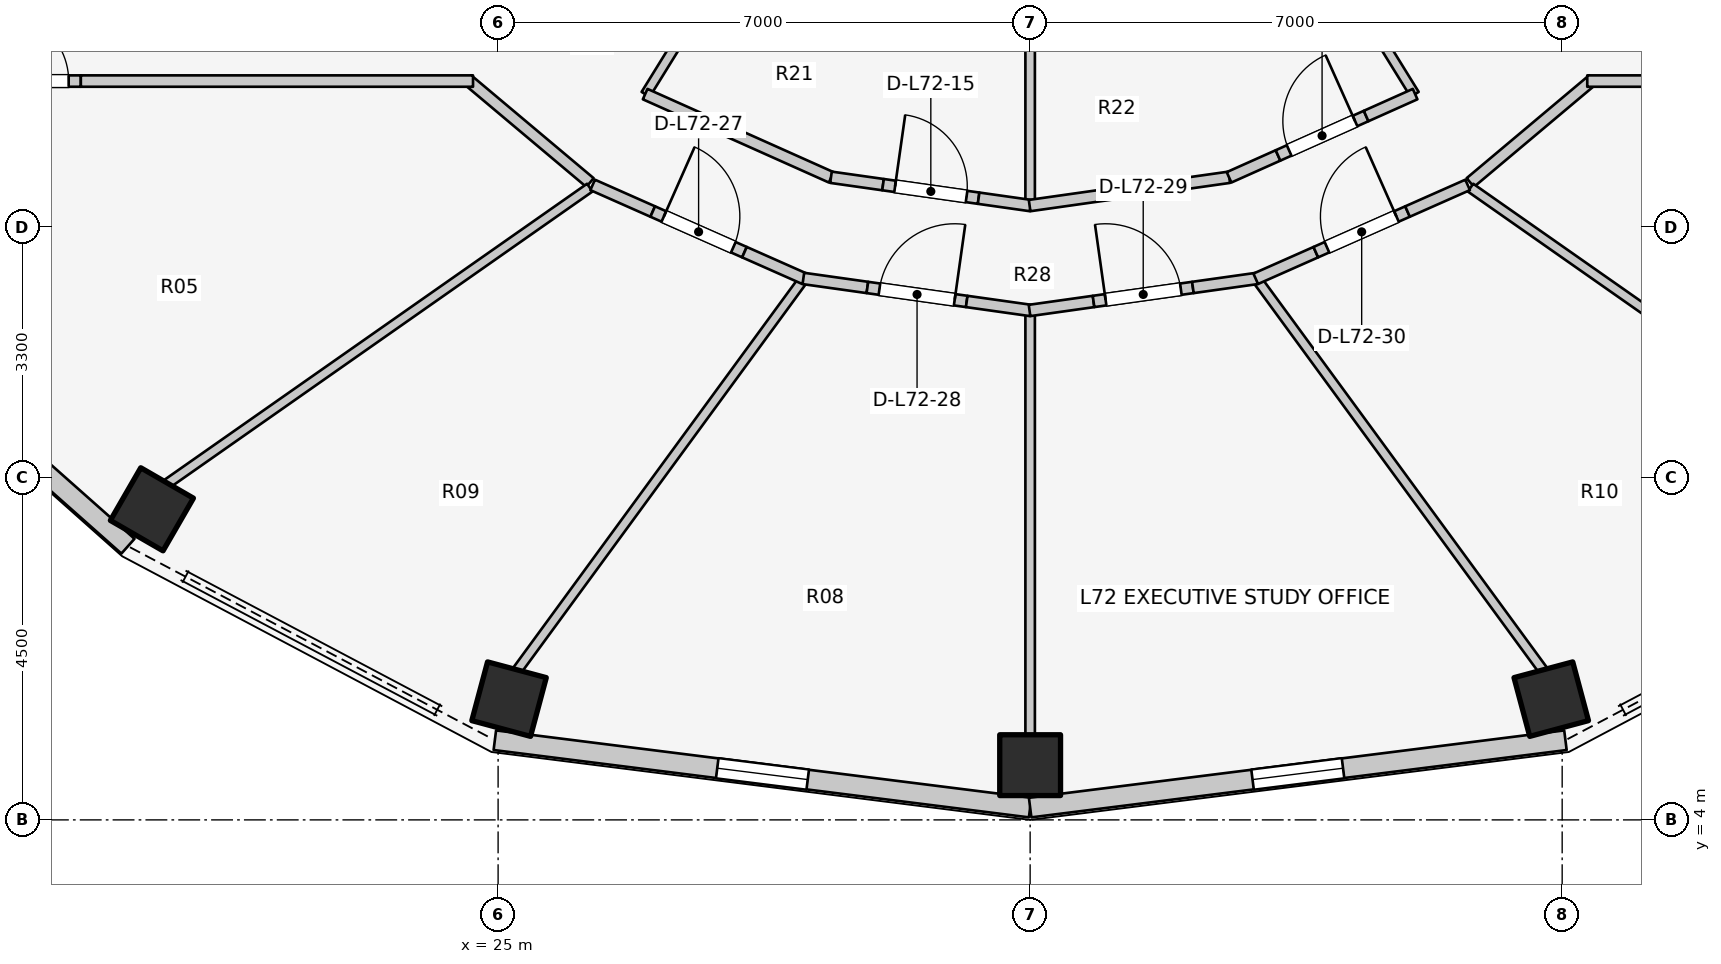
"""IFC4 building model, lengths in metres.
Left out: names, types, materials, properties, quantities, classifications, styles, units other than length and angle.
Written with IfcOpenShell. Run it as: python <this file> out.ifc"""

import sys

from ifc_helpers import new_model, si_unit, direction, frame, frame_2d, origin, origin_2d, place, context, subcontext, project, spatial, rectangle, extrude, element, fill, save


model = new_model("IFC4")
c1 = context("Model", 3, precision=1e-05, world=origin(), true_north=direction((0.0, 1.0)))
c2 = subcontext(c1, "Body", "Model", "MODEL_VIEW")
j1 = project(units=[si_unit("LENGTHUNIT", "METRE"), si_unit("PLANEANGLEUNIT", "RADIAN")], contexts=[c1])
p1 = place(None, origin())
s1 = spatial("IfcSite", under=j1, at=p1, CompositionType="ELEMENT")
p2 = place(p1, origin())
s2 = spatial("IfcBuilding", under=s1, at=p2, CompositionType="ELEMENT")
p3 = place(p2, frame((0.0, 0.0, 235.7)))
s3 = spatial("IfcBuildingStorey", under=s2, at=p3, CompositionType="ELEMENT", Elevation=235.7)
for number, where, z_axis, x_axis in (
    (1, (20.445, 8.086, 0.0), (0.0, 0.0, 1.0), (-0.5, -0.866, 0.0)),
    (2, (25.144, 5.589, 0.0), (0.0, 0.0, 1.0), (-0.259, -0.966, 0.0)),
    (3, (32.0, 4.72, 0.0), (0.0, 0.0, 1.0), (0.0, -1.0, 0.0)),
    (4, (38.856, 5.589, 0.0), (0.0, 0.0, 1.0), (0.259, -0.966, 0.0)),
):
    element("IfcColumn", number, at=place(p3, frame(where, z_axis=z_axis, x_axis=x_axis)), inside=s3, PredefinedType="COLUMN", context=c2, shape_type="SweptSolid", body=[
        extrude(rectangle(XDim=0.8, YDim=0.8, at=origin_2d()), origin(), (0.0, 0.0, 1.0), 3.1),
    ])
p4 = place(p3, frame((16.442, 10.871, 0.0), z_axis=(0.0, 0.0, 1.0), x_axis=(0.748165854006, -0.663511759428, 0.0)))
e5 = element("IfcWall", 5, at=p4, inside=s3, PredefinedType="STANDARD", context=c2, shape_type="SweptSolid", body=[
    extrude(rectangle(XDim=4.929, YDim=0.26, at=frame_2d((2.464, 0.0))), origin(), (0.0, 0.0, 1.0), 1.22),
])
p5 = place(p3, frame((24.957, 5.048, 0.0), z_axis=(0.0, 0.0, 1.0), x_axis=(0.992180211307, -0.124813574142, 0.0)))
e6 = element("IfcWall", 6, at=p5, inside=s3, PredefinedType="STANDARD", context=c2, shape_type="SweptSolid", body=[
    extrude(rectangle(XDim=7.098, YDim=0.26, at=frame_2d((3.549, 0.0))), origin(), (0.0, 0.0, 1.0), 1.22),
])
p6 = place(p5, frame((2.949, 0.0, 0.15)))
e7 = element("IfcOpeningElement", 7, at=p6, cuts=e6, PredefinedType="OPENING", context=c2, shape_type="SweptSolid", body=[
    extrude(rectangle(XDim=1.2, YDim=0.9, at=frame_2d((0.6, 0.45))), frame((0.0, 0.14, 0.0), z_axis=(0.0, -1.0, 0.0), x_axis=(1.0, 0.0, 0.0)), (0.0, 0.0, 1.0), 0.28),
])
p7 = place(p3, frame((32.0, 4.162, 0.0), z_axis=(0.0, 0.0, 1.0), x_axis=(0.992180211307, 0.124813574142, 0.0)))
e8 = element("IfcWall", 8, at=p7, inside=s3, PredefinedType="STANDARD", context=c2, shape_type="SweptSolid", body=[
    extrude(rectangle(XDim=7.098, YDim=0.26, at=frame_2d((3.549, 0.0))), origin(), (0.0, 0.0, 1.0), 1.22),
])
p8 = place(p7, frame((2.949, 0.0, 0.15)))
e9 = element("IfcOpeningElement", 9, at=p8, cuts=e8, PredefinedType="OPENING", context=c2, shape_type="SweptSolid", body=[
    extrude(rectangle(XDim=1.2, YDim=0.9, at=frame_2d((0.6, 0.45))), frame((0.0, 0.14, 0.0), z_axis=(0.0, -1.0, 0.0), x_axis=(1.0, 0.0, 0.0)), (0.0, 0.0, 1.0), 0.28),
])
p9 = place(p3, frame((28.45, 15.985, 0.0), z_axis=(0.0, 0.0, 1.0), x_axis=(-0.52592395012, -0.850531597702, 0.0)))
e10 = element("IfcWall", 10, at=p9, inside=s3, PredefinedType="PARTITIONING", context=c2, shape_type="SweptSolid", body=[
    extrude(rectangle(XDim=2.869, YDim=0.125, at=frame_2d((1.435, 0.0))), origin(), (0.0, 0.0, 1.0), 2.096),
])
p10 = place(p3, frame((32.0, 14.9, 0.0), z_axis=(0.0, 0.0, 1.0), x_axis=(0.0, -1.0, 0.0)))
e11 = element("IfcWall", 11, at=p10, inside=s3, PredefinedType="PARTITIONING", context=c2, shape_type="SweptSolid", body=[
    extrude(rectangle(XDim=2.818, YDim=0.125, at=frame_2d((1.409, 0.0))), origin(), (0.0, 0.0, 1.0), 2.096),
])
p11 = place(p3, frame((35.55, 15.985, 0.0), z_axis=(0.0, 0.0, 1.0), x_axis=(0.52592395012, -0.850531597702, 0.0)))
e12 = element("IfcWall", 12, at=p11, inside=s3, PredefinedType="PARTITIONING", context=c2, shape_type="SweptSolid", body=[
    extrude(rectangle(XDim=2.869, YDim=0.125, at=frame_2d((1.435, 0.0))), origin(), (0.0, 0.0, 1.0), 2.096),
])
p12 = place(p3, frame((26.935, 13.549, 0.0), z_axis=(0.0, 0.0, 1.0), x_axis=(0.912859324183, -0.408274239027, 0.0)))
e13 = element("IfcWall", 13, at=p12, inside=s3, PredefinedType="PARTITIONING", context=c2, shape_type="SweptSolid", body=[
    extrude(rectangle(XDim=2.682, YDim=0.15, at=frame_2d((1.341, 0.0))), origin(), (0.0, 0.0, 1.0), 2.096),
])
p13 = place(p3, frame((29.38, 12.455, 0.0), z_axis=(0.0, 0.0, 1.0), x_axis=(0.990090139669, -0.140433312754, 0.0)))
e14 = element("IfcWall", 14, at=p13, inside=s3, PredefinedType="PARTITIONING", context=c2, shape_type="SweptSolid", body=[
    extrude(rectangle(XDim=0.692, YDim=0.15, at=frame_2d((0.346, 0.0))), origin(), (0.0, 0.0, 1.0), 2.575),
])
p14 = place(p3, frame((30.065, 12.357, 0.0), z_axis=(0.0, 0.0, 1.0), x_axis=(0.990102710588, -0.140344656064, 0.0)))
e15 = element("IfcWall", 15, at=p14, inside=s3, PredefinedType="PARTITIONING", context=c2, shape_type="SweptSolid", body=[
    extrude(rectangle(XDim=1.27, YDim=0.15, at=frame_2d((0.635, 0.0))), origin(), (0.0, 0.0, 1.0), 2.575),
])
p15 = place(p14, frame((0.16, 0.0, 0.0)))
e16 = element("IfcOpeningElement", 16, at=p15, cuts=e15, PredefinedType="OPENING", context=c2, shape_type="SweptSolid", body=[
    extrude(rectangle(XDim=0.95, YDim=2.1, at=frame_2d((0.475, 1.05))), frame((0.0, 0.085, 0.0), z_axis=(0.0, -1.0, 0.0), x_axis=(1.0, 0.0, 0.0)), (0.0, 0.0, 1.0), 0.17),
])
p16 = place(p3, frame((31.322, 12.179, 0.0), z_axis=(0.0, 0.0, 1.0), x_axis=(0.990090139669, -0.140433312754, 0.0)))
e17 = element("IfcWall", 17, at=p16, inside=s3, PredefinedType="PARTITIONING", context=c2, shape_type="SweptSolid", body=[
    extrude(rectangle(XDim=0.692, YDim=0.15, at=frame_2d((0.346, 0.0))), origin(), (0.0, 0.0, 1.0), 2.096),
])
p17 = place(p3, frame((31.993, 12.082, 0.0), z_axis=(0.0, 0.0, 1.0), x_axis=(0.990096156252, 0.140390887794, 0.0)))
e18 = element("IfcWall", 18, at=p17, inside=s3, PredefinedType="PARTITIONING", context=c2, shape_type="SweptSolid", body=[
    extrude(rectangle(XDim=2.654, YDim=0.15, at=frame_2d((1.327, 0.0))), origin(), (0.0, 0.0, 1.0), 2.096),
])
p18 = place(p3, frame((34.617, 12.454, 0.0), z_axis=(0.0, 0.0, 1.0), x_axis=(0.912953893823, 0.408062725269, 0.0)))
e19 = element("IfcWall", 19, at=p18, inside=s3, PredefinedType="PARTITIONING", context=c2, shape_type="SweptSolid", body=[
    extrude(rectangle(XDim=0.706, YDim=0.15, at=frame_2d((0.353, 0.0))), origin(), (0.0, 0.0, 1.0), 2.096),
])
p19 = place(p3, frame((35.261, 12.742, 0.0), z_axis=(0.0, 0.0, 1.0), x_axis=(0.912825795494, 0.408349197479, 0.0)))
e20 = element("IfcWall", 20, at=p19, inside=s3, PredefinedType="PARTITIONING", context=c2, shape_type="SweptSolid", body=[
    extrude(rectangle(XDim=1.27, YDim=0.15, at=frame_2d((0.635, 0.0))), origin(), (0.0, 0.0, 1.0), 2.16),
])
p20 = place(p19, frame((0.16, 0.0, 0.0)))
e21 = element("IfcOpeningElement", 21, at=p20, cuts=e20, PredefinedType="OPENING", context=c2, shape_type="SweptSolid", body=[
    extrude(rectangle(XDim=0.95, YDim=2.1, at=frame_2d((0.475, 1.05))), frame((0.0, 0.085, 0.0), z_axis=(0.0, -1.0, 0.0), x_axis=(1.0, 0.0, 0.0)), (0.0, 0.0, 1.0), 0.17),
])
p21 = place(p3, frame((36.421, 13.26, 0.0), z_axis=(0.0, 0.0, 1.0), x_axis=(0.912825035427, 0.40835089653, 0.0)))
e22 = element("IfcWall", 22, at=p21, inside=s3, PredefinedType="PARTITIONING", context=c2, shape_type="SweptSolid", body=[
    extrude(rectangle(XDim=0.706, YDim=0.15, at=frame_2d((0.353, 0.0))), origin(), (0.0, 0.0, 1.0), 2.575),
])
p22 = place(p3, frame((26.209, 12.385, 0.0), z_axis=(0.0, 0.0, 1.0), x_axis=(-0.765677451641, 0.643224719711, 0.0)))
e23 = element("IfcWall", 23, at=p22, inside=s3, PredefinedType="PARTITIONING", context=c2, shape_type="SweptSolid", body=[
    extrude(rectangle(XDim=2.105, YDim=0.15, at=frame_2d((1.053, 0.0))), origin(), (0.0, 0.0, 1.0), 2.096),
])
p23 = place(p3, frame((18.29, 13.72, 0.0), z_axis=(0.0, 0.0, 1.0), x_axis=(1.0, 0.0, 0.0)))
e24 = element("IfcWall", 24, at=p23, inside=s3, PredefinedType="PARTITIONING", context=c2, shape_type="SweptSolid", body=[
    extrude(rectangle(XDim=1.22, YDim=0.15, at=frame_2d((0.61, 0.0))), origin(), (0.0, 0.0, 1.0), 2.575),
])
p24 = place(p23, frame((0.16, 0.0, 0.0)))
e25 = element("IfcOpeningElement", 25, at=p24, cuts=e24, PredefinedType="OPENING", context=c2, shape_type="SweptSolid", body=[
    extrude(rectangle(XDim=0.9, YDim=2.1, at=frame_2d((0.45, 1.05))), frame((0.0, 0.085, 0.0), z_axis=(0.0, -1.0, 0.0), x_axis=(1.0, 0.0, 0.0)), (0.0, 0.0, 1.0), 0.17),
])
p25 = place(p3, frame((19.51, 13.72, 0.0), z_axis=(0.0, 0.0, 1.0), x_axis=(1.0, 0.0, 0.0)))
e26 = element("IfcWall", 26, at=p25, inside=s3, PredefinedType="PARTITIONING", context=c2, shape_type="SweptSolid", body=[
    extrude(rectangle(XDim=5.16, YDim=0.15, at=frame_2d((2.58, 0.0))), origin(), (0.0, 0.0, 1.0), 2.096),
])
p26 = place(p3, frame((37.791, 12.385, 0.0), z_axis=(0.0, 0.0, 1.0), x_axis=(0.765677451641, 0.643224719711, 0.0)))
e27 = element("IfcWall", 27, at=p26, inside=s3, PredefinedType="PARTITIONING", context=c2, shape_type="SweptSolid", body=[
    extrude(rectangle(XDim=2.105, YDim=0.15, at=frame_2d((1.053, 0.0))), origin(), (0.0, 0.0, 1.0), 2.096),
])
p27 = place(p3, frame((39.33, 13.72, 0.0), z_axis=(0.0, 0.0, 1.0), x_axis=(1.0, 0.0, 0.0)))
e28 = element("IfcWall", 28, at=p27, inside=s3, PredefinedType="PARTITIONING", context=c2, shape_type="SweptSolid", body=[
    extrude(rectangle(XDim=5.06, YDim=0.15, at=frame_2d((2.53, 0.0))), origin(), (0.0, 0.0, 1.0), 2.096),
])
p28 = place(p3, frame((26.206, 12.318, 0.0), z_axis=(0.0, 0.0, 1.0), x_axis=(-0.819017716307, -0.573768228796, 0.0)))
e29 = element("IfcWall", 29, at=p28, inside=s3, PredefinedType="PARTITIONING", context=c2, shape_type="SweptSolid", body=[
    extrude(rectangle(XDim=6.802, YDim=0.125, at=frame_2d((3.401, 0.0))), origin(), (0.0, 0.0, 1.0), 1.22),
])
p29 = place(p3, frame((28.992, 11.077, 0.0), z_axis=(0.0, 0.0, 1.0), x_axis=(-0.590771495169, -0.806838918555, 0.0)))
e30 = element("IfcWall", 30, at=p29, inside=s3, PredefinedType="PARTITIONING", context=c2, shape_type="SweptSolid", body=[
    extrude(rectangle(XDim=6.347, YDim=0.125, at=frame_2d((3.173, 0.0))), origin(), (0.0, 0.0, 1.0), 1.22),
])
p30 = place(p3, frame((32.0, 10.647, 0.0), z_axis=(0.0, 0.0, 1.0), x_axis=(0.0, -1.0, 0.0)))
e31 = element("IfcWall", 31, at=p30, inside=s3, PredefinedType="PARTITIONING", context=c2, shape_type="SweptSolid", body=[
    extrude(rectangle(XDim=5.547, YDim=0.125, at=frame_2d((2.773, 0.0))), origin(), (0.0, 0.0, 1.0), 1.22),
])
p31 = place(p3, frame((35.008, 11.077, 0.0), z_axis=(0.0, 0.0, 1.0), x_axis=(0.590771495169, -0.806838918555, 0.0)))
e32 = element("IfcWall", 32, at=p31, inside=s3, PredefinedType="PARTITIONING", context=c2, shape_type="SweptSolid", body=[
    extrude(rectangle(XDim=6.347, YDim=0.125, at=frame_2d((3.173, 0.0))), origin(), (0.0, 0.0, 1.0), 1.22),
])
p32 = place(p3, frame((37.794, 12.318, 0.0), z_axis=(0.0, 0.0, 1.0), x_axis=(0.819017716307, -0.573768228796, 0.0)))
e33 = element("IfcWall", 33, at=p32, inside=s3, PredefinedType="PARTITIONING", context=c2, shape_type="SweptSolid", body=[
    extrude(rectangle(XDim=6.802, YDim=0.125, at=frame_2d((3.401, 0.0))), origin(), (0.0, 0.0, 1.0), 1.22),
])
p33 = place(p3, frame((26.244, 12.354, 0.0), z_axis=(0.0, 0.0, 1.0), x_axis=(0.914241833088, -0.405168940853, 0.0)))
e34 = element("IfcWall", 34, at=p33, inside=s3, PredefinedType="PARTITIONING", context=c2, shape_type="SweptSolid", body=[
    extrude(rectangle(XDim=0.865, YDim=0.15, at=frame_2d((0.432, 0.0))), origin(), (0.0, 0.0, 1.0), 2.575),
])
p34 = place(p3, frame((27.034, 12.004, 0.0), z_axis=(0.0, 0.0, 1.0), x_axis=(0.914314172667, -0.405005671145, 0.0)))
e35 = element("IfcWall", 35, at=p34, inside=s3, PredefinedType="PARTITIONING", context=c2, shape_type="SweptSolid", body=[
    extrude(rectangle(XDim=1.32, YDim=0.15, at=frame_2d((0.66, 0.0))), origin(), (0.0, 0.0, 1.0), 2.16),
])
p35 = place(p34, frame((0.16, 0.0, 0.0)))
e36 = element("IfcOpeningElement", 36, at=p35, cuts=e35, PredefinedType="OPENING", context=c2, shape_type="SweptSolid", body=[
    extrude(rectangle(XDim=1.0, YDim=2.1, at=frame_2d((0.5, 1.05))), frame((0.0, 0.085, 0.0), z_axis=(0.0, -1.0, 0.0), x_axis=(1.0, 0.0, 0.0)), (0.0, 0.0, 1.0), 0.17),
])
p36 = place(p3, frame((28.241, 11.469, 0.0), z_axis=(0.0, 0.0, 1.0), x_axis=(0.914346402493, -0.40493290339, 0.0)))
e37 = element("IfcWall", 37, at=p36, inside=s3, PredefinedType="PARTITIONING", context=c2, shape_type="SweptSolid", body=[
    extrude(rectangle(XDim=0.865, YDim=0.15, at=frame_2d((0.432, 0.0))), origin(), (0.0, 0.0, 1.0), 2.096),
])
p37 = place(p3, frame((29.016, 11.123, 0.0), z_axis=(0.0, 0.0, 1.0), x_axis=(0.99022315503, -0.139492305317, 0.0)))
e38 = element("IfcWall", 38, at=p37, inside=s3, PredefinedType="PARTITIONING", context=c2, shape_type="SweptSolid", body=[
    extrude(rectangle(XDim=0.851, YDim=0.15, at=frame_2d((0.425, 0.0))), origin(), (0.0, 0.0, 1.0), 2.575),
])
p38 = place(p3, frame((29.859, 11.005, 0.0), z_axis=(0.0, 0.0, 1.0), x_axis=(0.990228663531, -0.139453196171, 0.0)))
e39 = element("IfcWall", 39, at=p38, inside=s3, PredefinedType="PARTITIONING", context=c2, shape_type="SweptSolid", body=[
    extrude(rectangle(XDim=1.32, YDim=0.15, at=frame_2d((0.66, 0.0))), origin(), (0.0, 0.0, 1.0), 2.575),
])
p39 = place(p38, frame((0.16, 0.0, 0.0)))
e40 = element("IfcOpeningElement", 40, at=p39, cuts=e39, PredefinedType="OPENING", context=c2, shape_type="SweptSolid", body=[
    extrude(rectangle(XDim=1.0, YDim=2.1, at=frame_2d((0.5, 1.05))), frame((0.0, 0.085, 0.0), z_axis=(0.0, -1.0, 0.0), x_axis=(1.0, 0.0, 0.0)), (0.0, 0.0, 1.0), 0.17),
])
for number, where, z_axis, x_axis in (
    (41, (31.166, 10.821, 0.0), (0.0, 0.0, 1.0), (0.99, -0.139, 0.0)),
    (42, (31.992, 10.702, 0.0), (0.0, 0.0, 1.0), (0.99, 0.139, 0.0)),
):
    element("IfcWall", number, at=place(p3, frame(where, z_axis=z_axis, x_axis=x_axis)), inside=s3, PredefinedType="PARTITIONING", context=c2, shape_type="SweptSolid", body=[
        extrude(rectangle(XDim=0.851, YDim=0.15, at=frame_2d((0.425, 0.0))), origin(), (0.0, 0.0, 1.0), 2.096),
    ])
p40 = place(p3, frame((32.834, 10.821, 0.0), z_axis=(0.0, 0.0, 1.0), x_axis=(0.990228663531, 0.139453196171, 0.0)))
e43 = element("IfcWall", 43, at=p40, inside=s3, PredefinedType="PARTITIONING", context=c2, shape_type="SweptSolid", body=[
    extrude(rectangle(XDim=1.32, YDim=0.15, at=frame_2d((0.66, 0.0))), origin(), (0.0, 0.0, 1.0), 2.575),
])
p41 = place(p40, frame((0.16, 0.0, 0.0)))
e44 = element("IfcOpeningElement", 44, at=p41, cuts=e43, PredefinedType="OPENING", context=c2, shape_type="SweptSolid", body=[
    extrude(rectangle(XDim=1.0, YDim=2.1, at=frame_2d((0.5, 1.05))), frame((0.0, 0.085, 0.0), z_axis=(0.0, -1.0, 0.0), x_axis=(1.0, 0.0, 0.0)), (0.0, 0.0, 1.0), 0.17),
])
p42 = place(p3, frame((34.141, 11.005, 0.0), z_axis=(0.0, 0.0, 1.0), x_axis=(0.99022315503, 0.139492305317, 0.0)))
e45 = element("IfcWall", 45, at=p42, inside=s3, PredefinedType="PARTITIONING", context=c2, shape_type="SweptSolid", body=[
    extrude(rectangle(XDim=0.851, YDim=0.15, at=frame_2d((0.425, 0.0))), origin(), (0.0, 0.0, 1.0), 2.575),
])
p43 = place(p3, frame((34.968, 11.119, 0.0), z_axis=(0.0, 0.0, 1.0), x_axis=(0.914346402493, 0.40493290339, 0.0)))
e46 = element("IfcWall", 46, at=p43, inside=s3, PredefinedType="PARTITIONING", context=c2, shape_type="SweptSolid", body=[
    extrude(rectangle(XDim=0.865, YDim=0.15, at=frame_2d((0.432, 0.0))), origin(), (0.0, 0.0, 1.0), 2.096),
])
p44 = place(p3, frame((35.759, 11.469, 0.0), z_axis=(0.0, 0.0, 1.0), x_axis=(0.914314172667, 0.405005671145, 0.0)))
e47 = element("IfcWall", 47, at=p44, inside=s3, PredefinedType="PARTITIONING", context=c2, shape_type="SweptSolid", body=[
    extrude(rectangle(XDim=1.32, YDim=0.15, at=frame_2d((0.66, 0.0))), origin(), (0.0, 0.0, 1.0), 2.16),
])
p45 = place(p44, frame((0.16, 0.0, 0.0)))
e48 = element("IfcOpeningElement", 48, at=p45, cuts=e47, PredefinedType="OPENING", context=c2, shape_type="SweptSolid", body=[
    extrude(rectangle(XDim=1.0, YDim=2.1, at=frame_2d((0.5, 1.05))), frame((0.0, 0.085, 0.0), z_axis=(0.0, -1.0, 0.0), x_axis=(1.0, 0.0, 0.0)), (0.0, 0.0, 1.0), 0.17),
])
p46 = place(p3, frame((36.966, 12.004, 0.0), z_axis=(0.0, 0.0, 1.0), x_axis=(0.914241833088, 0.405168940853, 0.0)))
e49 = element("IfcWall", 49, at=p46, inside=s3, PredefinedType="PARTITIONING", context=c2, shape_type="SweptSolid", body=[
    extrude(rectangle(XDim=0.865, YDim=0.15, at=frame_2d((0.432, 0.0))), origin(), (0.0, 0.0, 1.0), 2.575),
])
p47 = place(p6, origin())
e50 = element("IfcWindow", 50, at=p47, inside=s3, PartitioningType="SINGLE_PANEL", PredefinedType="WINDOW", context=c2, shape_type="SweptSolid", body=[
    extrude(rectangle(XDim=1.2, YDim=0.9, at=frame_2d((0.6, 0.45))), frame((0.0, 0.03, 0.0), z_axis=(0.0, -1.0, 0.0), x_axis=(1.0, 0.0, 0.0)), (0.0, 0.0, 1.0), 0.06),
])
fill(e7, e50)
p48 = place(p8, origin())
e51 = element("IfcWindow", 51, at=p48, inside=s3, PartitioningType="SINGLE_PANEL", PredefinedType="WINDOW", context=c2, shape_type="SweptSolid", body=[
    extrude(rectangle(XDim=1.2, YDim=0.9, at=frame_2d((0.6, 0.45))), frame((0.0, 0.03, 0.0), z_axis=(0.0, -1.0, 0.0), x_axis=(1.0, 0.0, 0.0)), (0.0, 0.0, 1.0), 0.06),
])
fill(e9, e51)
p49 = place(p15, origin())
e52 = element("IfcDoor", 52, at=p49, inside=s3, OperationType="SINGLE_SWING_LEFT", PredefinedType="DOOR", context=c2, shape_type="SweptSolid", body=[
    extrude(rectangle(XDim=0.95, YDim=2.1, at=frame_2d((0.475, 1.05))), frame((0.0, 0.025, 0.0), z_axis=(0.0, -1.0, 0.0), x_axis=(1.0, 0.0, 0.0)), (0.0, 0.0, 1.0), 0.05),
])
fill(e16, e52)
p50 = place(p20, origin())
e53 = element("IfcDoor", 53, at=p50, inside=s3, OperationType="SINGLE_SWING_RIGHT", PredefinedType="DOOR", context=c2, shape_type="SweptSolid", body=[
    extrude(rectangle(XDim=0.95, YDim=2.1, at=frame_2d((0.475, 1.05))), frame((0.0, 0.025, 0.0), z_axis=(0.0, -1.0, 0.0), x_axis=(1.0, 0.0, 0.0)), (0.0, 0.0, 1.0), 0.05),
])
fill(e21, e53)
p51 = place(p24, origin())
e54 = element("IfcDoor", 54, at=p51, inside=s3, OperationType="SINGLE_SWING_LEFT", PredefinedType="DOOR", context=c2, shape_type="SweptSolid", body=[
    extrude(rectangle(XDim=0.9, YDim=2.1, at=frame_2d((0.45, 1.05))), frame((0.0, 0.025, 0.0), z_axis=(0.0, -1.0, 0.0), x_axis=(1.0, 0.0, 0.0)), (0.0, 0.0, 1.0), 0.05),
])
fill(e25, e54)
p52 = place(p35, origin())
e55 = element("IfcDoor", 55, at=p52, inside=s3, OperationType="SINGLE_SWING_LEFT", PredefinedType="DOOR", context=c2, shape_type="SweptSolid", body=[
    extrude(rectangle(XDim=1.0, YDim=2.1, at=frame_2d((0.5, 1.05))), frame((0.0, 0.025, 0.0), z_axis=(0.0, -1.0, 0.0), x_axis=(1.0, 0.0, 0.0)), (0.0, 0.0, 1.0), 0.05),
])
fill(e36, e55)
p53 = place(p39, origin())
e56 = element("IfcDoor", 56, at=p53, inside=s3, OperationType="SINGLE_SWING_RIGHT", PredefinedType="DOOR", context=c2, shape_type="SweptSolid", body=[
    extrude(rectangle(XDim=1.0, YDim=2.1, at=frame_2d((0.5, 1.05))), frame((0.0, 0.025, 0.0), z_axis=(0.0, -1.0, 0.0), x_axis=(1.0, 0.0, 0.0)), (0.0, 0.0, 1.0), 0.05),
])
fill(e40, e56)
p54 = place(p41, origin())
e57 = element("IfcDoor", 57, at=p54, inside=s3, OperationType="SINGLE_SWING_LEFT", PredefinedType="DOOR", context=c2, shape_type="SweptSolid", body=[
    extrude(rectangle(XDim=1.0, YDim=2.1, at=frame_2d((0.5, 1.05))), frame((0.0, 0.025, 0.0), z_axis=(0.0, -1.0, 0.0), x_axis=(1.0, 0.0, 0.0)), (0.0, 0.0, 1.0), 0.05),
])
fill(e44, e57)
p55 = place(p45, origin())
e58 = element("IfcDoor", 58, at=p55, inside=s3, OperationType="SINGLE_SWING_RIGHT", PredefinedType="DOOR", context=c2, shape_type="SweptSolid", body=[
    extrude(rectangle(XDim=1.0, YDim=2.1, at=frame_2d((0.5, 1.05))), frame((0.0, 0.025, 0.0), z_axis=(0.0, -1.0, 0.0), x_axis=(1.0, 0.0, 0.0)), (0.0, 0.0, 1.0), 0.05),
])
fill(e48, e58)
save(model, sys.argv[1])
